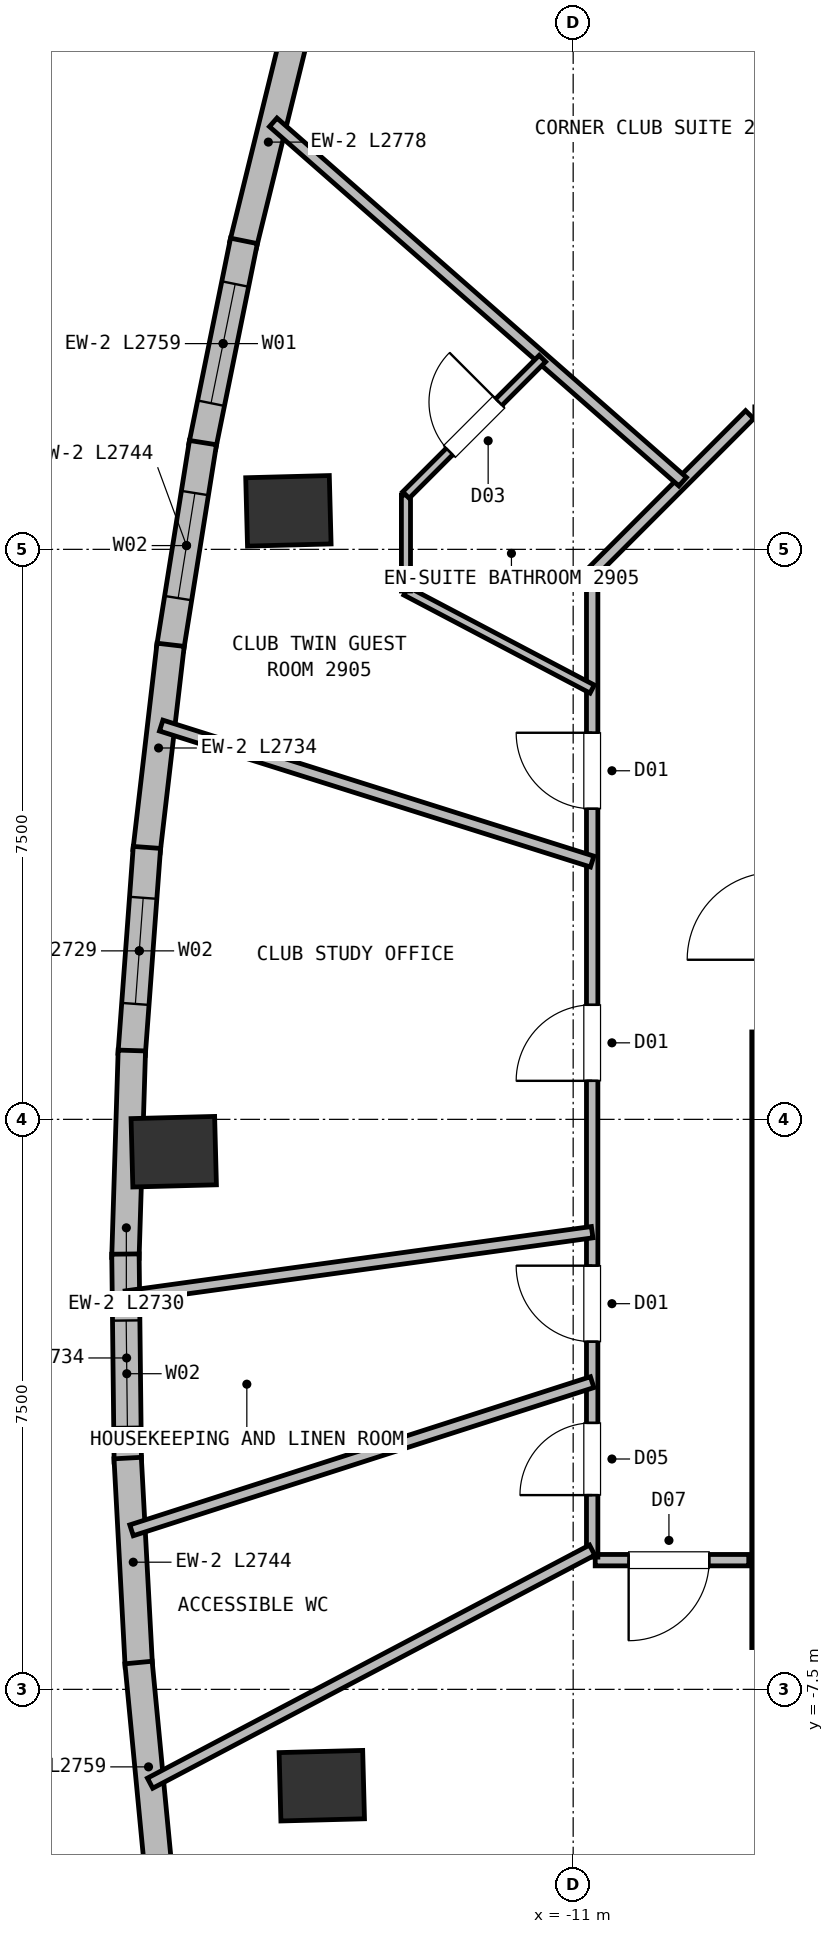
"""IFC4 building model, lengths in metres.
Left out: names, types, materials, properties, quantities, classifications, styles, units other than length and angle.
Written with IfcOpenShell. Run it as: python <this file> out.ifc"""

import sys

from ifc_helpers import new_model, si_unit, direction, frame, frame_2d, origin, origin_2d, place, context, subcontext, project, spatial, rectangle, extrude, element, fill, save


model = new_model("IFC4")
c1 = context("Model", 3, precision=1e-05, world=origin(), true_north=direction((0.0, 1.0)))
c2 = subcontext(c1, "Body", "Model", "MODEL_VIEW")
j1 = project(units=[si_unit("LENGTHUNIT", "METRE"), si_unit("PLANEANGLEUNIT", "RADIAN")], contexts=[c1])
p1 = place(None, origin())
s1 = spatial("IfcSite", under=j1, at=p1, CompositionType="ELEMENT")
p2 = place(p1, origin())
s2 = spatial("IfcBuilding", under=s1, at=p2, CompositionType="ELEMENT")
p3 = place(p2, frame((0.0, 0.0, 108.5)))
s3 = spatial("IfcBuildingStorey", under=s2, at=p3, CompositionType="ELEMENT", Elevation=108.5)
p4 = place(p3, frame((-8.35, -6.95, 0.0), z_axis=(0.0, 0.0, 1.0), x_axis=(0.0, 1.0, 0.0)))
e1 = element("IfcWall", 1, at=p4, inside=s3, PredefinedType="SHEAR", context=c2, shape_type="SweptSolid", body=[
    extrude(rectangle(XDim=8.1, YDim=0.6, at=frame_2d((4.05, 0.0))), origin(), (0.0, 0.0, 1.0), 3.5),
])
for number, where, z_axis, x_axis in (
    (2, (-14.747, 8.007, 0.0), (0.0, 0.0, 1.0), (-0.026, 1.0, 0.0)),
    (3, (-16.255, -0.426, 0.0), (0.0, 0.0, 1.0), (-0.026, 1.0, 0.0)),
    (4, (-14.307, -8.768, 0.0), (0.0, 0.0, 1.0), (-0.026, 1.0, 0.0)),
):
    element("IfcColumn", number, at=place(p3, frame(where, z_axis=z_axis, x_axis=x_axis)), inside=s3, PredefinedType="COLUMN", context=c2, shape_type="SweptSolid", body=[
        extrude(rectangle(XDim=0.9, YDim=1.1, at=origin_2d()), origin(), (0.0, 0.0, 1.0), 3.75),
    ])
p5 = place(p3, frame((-15.342, 11.51, 0.0), z_axis=(0.0, 0.0, 1.0), x_axis=(0.238997371457, 0.971020214227, 0.0)))
e5 = element("IfcWall", 5, at=p5, inside=s3, PredefinedType="SOLIDWALL", context=c2, shape_type="SweptSolid", body=[
    extrude(rectangle(XDim=2.778, YDim=0.36, at=frame_2d((1.389, 0.0))), origin(), (0.0, 0.0, 1.0), 3.5),
])
p6 = place(p3, frame((-15.88, 8.855, 0.0), z_axis=(0.0, 0.0, 1.0), x_axis=(0.198770408376, 0.980046082975, 0.0)))
e6 = element("IfcWall", 6, at=p6, inside=s3, PredefinedType="SOLIDWALL", context=c2, shape_type="SweptSolid", body=[
    extrude(rectangle(XDim=2.759, YDim=0.36, at=frame_2d((1.379, 0.0))), origin(), (0.0, 0.0, 1.0), 3.5),
])
p7 = place(p6, frame((0.579, 0.0, 0.72)))
e7 = element("IfcOpeningElement", 7, at=p7, cuts=e6, PredefinedType="OPENING", context=c2, shape_type="SweptSolid", body=[
    extrude(rectangle(XDim=1.6, YDim=1.88, at=frame_2d((0.8, 0.94))), frame((0.0, 0.19, 0.0), z_axis=(0.0, -1.0, 0.0), x_axis=(1.0, 0.0, 0.0)), (0.0, 0.0, 1.0), 0.38),
])
p8 = place(p3, frame((-16.303, 6.195, 0.0), z_axis=(0.0, 0.0, 1.0), x_axis=(0.157483842532, 0.987521563988, 0.0)))
e8 = element("IfcWall", 8, at=p8, inside=s3, PredefinedType="SOLIDWALL", context=c2, shape_type="SweptSolid", body=[
    extrude(rectangle(XDim=2.744, YDim=0.36, at=frame_2d((1.372, 0.0))), origin(), (0.0, 0.0, 1.0), 3.5),
])
p9 = place(p8, frame((0.672, 0.0, 0.72)))
e9 = element("IfcOpeningElement", 9, at=p9, cuts=e8, PredefinedType="OPENING", context=c2, shape_type="SweptSolid", body=[
    extrude(rectangle(XDim=1.4, YDim=1.84, at=frame_2d((0.7, 0.92))), frame((0.0, 0.19, 0.0), z_axis=(0.0, -1.0, 0.0), x_axis=(1.0, 0.0, 0.0)), (0.0, 0.0, 1.0), 0.38),
])
p10 = place(p3, frame((-16.613, 3.528, 0.0), z_axis=(0.0, 0.0, 1.0), x_axis=(0.115711868465, 0.993282821505, 0.0)))
e10 = element("IfcWall", 10, at=p10, inside=s3, PredefinedType="SOLIDWALL", context=c2, shape_type="SweptSolid", body=[
    extrude(rectangle(XDim=2.734, YDim=0.36, at=frame_2d((1.367, 0.0))), origin(), (0.0, 0.0, 1.0), 3.5),
])
p11 = place(p3, frame((-16.809, 0.856, 0.0), z_axis=(0.0, 0.0, 1.0), x_axis=(0.07352900805, 0.997293078776, 0.0)))
e11 = element("IfcWall", 11, at=p11, inside=s3, PredefinedType="SOLIDWALL", context=c2, shape_type="SweptSolid", body=[
    extrude(rectangle(XDim=2.729, YDim=0.36, at=frame_2d((1.365, 0.0))), origin(), (0.0, 0.0, 1.0), 3.5),
])
p12 = place(p11, frame((0.665, 0.0, 0.72)))
e12 = element("IfcOpeningElement", 12, at=p12, cuts=e11, PredefinedType="OPENING", context=c2, shape_type="SweptSolid", body=[
    extrude(rectangle(XDim=1.4, YDim=1.84, at=frame_2d((0.7, 0.92))), frame((0.0, 0.19, 0.0), z_axis=(0.0, -1.0, 0.0), x_axis=(1.0, 0.0, 0.0)), (0.0, 0.0, 1.0), 0.38),
])
p13 = place(p3, frame((-16.891, -1.823, 0.0), z_axis=(0.0, 0.0, 1.0), x_axis=(0.031036495161, 0.999518251943, 0.0)))
e13 = element("IfcWall", 13, at=p13, inside=s3, PredefinedType="SOLIDWALL", context=c2, shape_type="SweptSolid", body=[
    extrude(rectangle(XDim=2.729, YDim=0.36, at=frame_2d((1.365, 0.0))), origin(), (0.0, 0.0, 1.0), 3.5),
])
p14 = place(p3, frame((-16.86, -4.507, 0.0), z_axis=(0.0, 0.0, 1.0), x_axis=(-0.011339569117, 0.999935705019, 0.0)))
e14 = element("IfcWall", 14, at=p14, inside=s3, PredefinedType="SOLIDWALL", context=c2, shape_type="SweptSolid", body=[
    extrude(rectangle(XDim=2.734, YDim=0.36, at=frame_2d((1.367, 0.0))), origin(), (0.0, 0.0, 1.0), 3.5),
])
p15 = place(p14, frame((0.46, 0.0, 0.72)))
e15 = element("IfcOpeningElement", 15, at=p15, cuts=e14, PredefinedType="OPENING", context=c2, shape_type="SweptSolid", body=[
    extrude(rectangle(XDim=1.4, YDim=1.84, at=frame_2d((0.7, 0.92))), frame((0.0, 0.19, 0.0), z_axis=(0.0, -1.0, 0.0), x_axis=(1.0, 0.0, 0.0)), (0.0, 0.0, 1.0), 0.38),
])
p16 = place(p3, frame((-16.715, -7.197, 0.0), z_axis=(0.0, 0.0, 1.0), x_axis=(-0.053474125499, 0.998569235407, 0.0)))
e16 = element("IfcWall", 16, at=p16, inside=s3, PredefinedType="SOLIDWALL", context=c2, shape_type="SweptSolid", body=[
    extrude(rectangle(XDim=2.744, YDim=0.36, at=frame_2d((1.372, 0.0))), origin(), (0.0, 0.0, 1.0), 3.5),
])
p17 = place(p3, frame((-16.456, -9.893, 0.0), z_axis=(0.0, 0.0, 1.0), x_axis=(-0.095147411159, 0.99546319377, 0.0)))
e17 = element("IfcWall", 17, at=p17, inside=s3, PredefinedType="SOLIDWALL", context=c2, shape_type="SweptSolid", body=[
    extrude(rectangle(XDim=2.758, YDim=0.36, at=frame_2d((1.379, 0.0))), origin(), (0.0, 0.0, 1.0), 3.5),
])
p18 = place(p3, frame((-8.69, -5.8, 0.0), z_axis=(0.0, 0.0, 1.0), x_axis=(-1.0, 0.0, 0.0)))
e18 = element("IfcWall", 18, at=p18, inside=s3, PredefinedType="PARTITIONING", context=c2, shape_type="SweptSolid", body=[
    extrude(rectangle(XDim=2.02, YDim=0.15, at=frame_2d((1.01, 0.0))), origin(), (0.0, 0.0, 1.0), 3.5),
])
p19 = place(p18, frame((0.52, 0.0, 0.0)))
e19 = element("IfcOpeningElement", 19, at=p19, cuts=e18, PredefinedType="OPENING", context=c2, shape_type="SweptSolid", body=[
    extrude(rectangle(XDim=1.06, YDim=2.15, at=frame_2d((0.53, 1.075))), frame((0.0, 0.085, 0.0), z_axis=(0.0, -1.0, 0.0), x_axis=(1.0, 0.0, 0.0)), (0.0, 0.0, 1.0), 0.17),
])
p20 = place(p3, frame((-10.722, 7.228, 0.0), z_axis=(0.0, 0.0, 1.0), x_axis=(0.707106781187, 0.707106781187, 0.0)))
e20 = element("IfcWall", 20, at=p20, inside=s3, PredefinedType="PARTITIONING", context=c2, shape_type="SweptSolid", body=[
    extrude(rectangle(XDim=2.89, YDim=0.15, at=frame_2d((1.445, 0.0))), origin(), (0.0, 0.0, 1.0), 3.5),
])
p21 = place(p3, frame((-10.75, -5.76, 0.0), z_axis=(0.0, 0.0, 1.0), x_axis=(0.0, 1.0, 0.0)))
e21 = element("IfcWall", 21, at=p21, inside=s3, PredefinedType="PARTITIONING", context=c2, shape_type="SweptSolid", body=[
    extrude(rectangle(XDim=12.92, YDim=0.15, at=frame_2d((6.46, 0.0))), origin(), (0.0, 0.0, 1.0), 3.5),
])
p22 = place(p21, frame((2.835, 0.0, 0.0)))
e22 = element("IfcOpeningElement", 22, at=p22, cuts=e21, PredefinedType="OPENING", context=c2, shape_type="SweptSolid", body=[
    extrude(rectangle(XDim=1.0, YDim=2.15, at=frame_2d((0.5, 1.075))), frame((0.0, 0.085, 0.0), z_axis=(0.0, -1.0, 0.0), x_axis=(1.0, 0.0, 0.0)), (0.0, 0.0, 1.0), 0.17),
])
p23 = place(p21, frame((0.816, 0.0, 0.0)))
e23 = element("IfcOpeningElement", 23, at=p23, cuts=e21, PredefinedType="OPENING", context=c2, shape_type="SweptSolid", body=[
    extrude(rectangle(XDim=0.95, YDim=2.1, at=frame_2d((0.475, 1.05))), frame((0.0, 0.085, 0.0), z_axis=(0.0, -1.0, 0.0), x_axis=(1.0, 0.0, 0.0)), (0.0, 0.0, 1.0), 0.17),
])
p24 = place(p21, frame((9.847, 0.0, 0.0)))
e24 = element("IfcOpeningElement", 24, at=p24, cuts=e21, PredefinedType="OPENING", context=c2, shape_type="SweptSolid", body=[
    extrude(rectangle(XDim=1.0, YDim=2.15, at=frame_2d((0.5, 1.075))), frame((0.0, 0.085, 0.0), z_axis=(0.0, -1.0, 0.0), x_axis=(1.0, 0.0, 0.0)), (0.0, 0.0, 1.0), 0.17),
])
p25 = place(p21, frame((6.267, 0.0, 0.0)))
e25 = element("IfcOpeningElement", 25, at=p25, cuts=e21, PredefinedType="OPENING", context=c2, shape_type="SweptSolid", body=[
    extrude(rectangle(XDim=1.0, YDim=2.15, at=frame_2d((0.5, 1.075))), frame((0.0, 0.085, 0.0), z_axis=(0.0, -1.0, 0.0), x_axis=(1.0, 0.0, 0.0)), (0.0, 0.0, 1.0), 0.17),
])
p26 = place(p3, frame((-10.75, -5.668, 0.0), z_axis=(0.0, 0.0, 1.0), x_axis=(-0.88456520122, -0.466416557158, 0.0)))
e26 = element("IfcWall", 26, at=p26, inside=s3, PredefinedType="PARTITIONING", context=c2, shape_type="SweptSolid", body=[
    extrude(rectangle(XDim=6.575, YDim=0.15, at=frame_2d((3.288, 0.0))), origin(), (0.0, 0.0, 1.0), 3.5),
])
p27 = place(p3, frame((-9.56, 8.39, 0.0), z_axis=(0.0, 0.0, 1.0), x_axis=(-0.751546074468, 0.659680602983, 0.0)))
e27 = element("IfcWall", 27, at=p27, inside=s3, PredefinedType="PARTITIONING", context=c2, shape_type="SweptSolid", body=[
    extrude(rectangle(XDim=7.167, YDim=0.15, at=frame_2d((3.584, 0.0))), origin(), (0.0, 0.0, 1.0), 3.5),
])
p28 = place(p3, frame((-13.2, 6.952, 0.0), z_axis=(0.0, 0.0, 1.0), x_axis=(0.884793871957, -0.465982622152, 0.0)))
e28 = element("IfcWall", 28, at=p28, inside=s3, PredefinedType="PARTITIONING", context=c2, shape_type="SweptSolid", body=[
    extrude(rectangle(XDim=2.769, YDim=0.12, at=frame_2d((1.385, 0.0))), origin(), (0.0, 0.0, 1.0), 3.5),
])
p29 = place(p3, frame((-13.2, 6.952, 0.0), z_axis=(0.0, 0.0, 1.0), x_axis=(0.0, 1.0, 0.0)))
e29 = element("IfcWall", 29, at=p29, inside=s3, PredefinedType="PARTITIONING", context=c2, shape_type="SweptSolid", body=[
    extrude(rectangle(XDim=1.263, YDim=0.12, at=frame_2d((0.631, 0.0))), origin(), (0.0, 0.0, 1.0), 3.5),
])
p30 = place(p3, frame((-13.2, 8.215, 0.0), z_axis=(0.0, 0.0, 1.0), x_axis=(0.707106781187, 0.707106781187, 0.0)))
e30 = element("IfcWall", 30, at=p30, inside=s3, PredefinedType="PARTITIONING", context=c2, shape_type="SweptSolid", body=[
    extrude(rectangle(XDim=2.539, YDim=0.12, at=frame_2d((1.27, 0.0))), origin(), (0.0, 0.0, 1.0), 3.5),
])
p31 = place(p30, frame((0.81, 0.0, 0.0)))
e31 = element("IfcOpeningElement", 31, at=p31, cuts=e30, PredefinedType="OPENING", context=c2, shape_type="SweptSolid", body=[
    extrude(rectangle(XDim=0.92, YDim=2.1, at=frame_2d((0.46, 1.05))), frame((0.0, 0.07, 0.0), z_axis=(0.0, -1.0, 0.0), x_axis=(1.0, 0.0, 0.0)), (0.0, 0.0, 1.0), 0.14),
])
p32 = place(p3, frame((-10.75, 3.392, 0.0), z_axis=(0.0, 0.0, 1.0), x_axis=(-0.953655865199, 0.300899469545, 0.0)))
e32 = element("IfcWall", 32, at=p32, inside=s3, PredefinedType="PARTITIONING", context=c2, shape_type="SweptSolid", body=[
    extrude(rectangle(XDim=5.946, YDim=0.15, at=frame_2d((2.973, 0.0))), origin(), (0.0, 0.0, 1.0), 3.5),
])
p33 = place(p3, frame((-10.75, -1.485, 0.0), z_axis=(0.0, 0.0, 1.0), x_axis=(-0.990603271239, -0.136766805219, 0.0)))
e33 = element("IfcWall", 33, at=p33, inside=s3, PredefinedType="PARTITIONING", context=c2, shape_type="SweptSolid", body=[
    extrude(rectangle(XDim=6.192, YDim=0.15, at=frame_2d((3.096, 0.0))), origin(), (0.0, 0.0, 1.0), 3.5),
])
p34 = place(p3, frame((-10.75, -3.458, 0.0), z_axis=(0.0, 0.0, 1.0), x_axis=(-0.951970686229, -0.306189177732, 0.0)))
e34 = element("IfcWall", 34, at=p34, inside=s3, PredefinedType="PARTITIONING", context=c2, shape_type="SweptSolid", body=[
    extrude(rectangle(XDim=6.366, YDim=0.15, at=frame_2d((3.183, 0.0))), origin(), (0.0, 0.0, 1.0), 3.5),
])
p35 = place(p7, origin())
e35 = element("IfcWindow", 35, at=p35, inside=s3, PartitioningType="SINGLE_PANEL", PredefinedType="WINDOW", context=c2, shape_type="SweptSolid", body=[
    extrude(rectangle(XDim=1.6, YDim=1.88, at=frame_2d((0.8, 0.94))), frame((0.0, 0.03, 0.0), z_axis=(0.0, -1.0, 0.0), x_axis=(1.0, 0.0, 0.0)), (0.0, 0.0, 1.0), 0.06),
])
fill(e7, e35)
p36 = place(p9, origin())
e36 = element("IfcWindow", 36, at=p36, inside=s3, PartitioningType="SINGLE_PANEL", PredefinedType="WINDOW", context=c2, shape_type="SweptSolid", body=[
    extrude(rectangle(XDim=1.4, YDim=1.84, at=frame_2d((0.7, 0.92))), frame((0.0, 0.03, 0.0), z_axis=(0.0, -1.0, 0.0), x_axis=(1.0, 0.0, 0.0)), (0.0, 0.0, 1.0), 0.06),
])
fill(e9, e36)
p37 = place(p12, origin())
e37 = element("IfcWindow", 37, at=p37, inside=s3, PartitioningType="SINGLE_PANEL", PredefinedType="WINDOW", context=c2, shape_type="SweptSolid", body=[
    extrude(rectangle(XDim=1.4, YDim=1.84, at=frame_2d((0.7, 0.92))), frame((0.0, 0.03, 0.0), z_axis=(0.0, -1.0, 0.0), x_axis=(1.0, 0.0, 0.0)), (0.0, 0.0, 1.0), 0.06),
])
fill(e12, e37)
p38 = place(p15, origin())
e38 = element("IfcWindow", 38, at=p38, inside=s3, PartitioningType="SINGLE_PANEL", PredefinedType="WINDOW", context=c2, shape_type="SweptSolid", body=[
    extrude(rectangle(XDim=1.4, YDim=1.84, at=frame_2d((0.7, 0.92))), frame((0.0, 0.03, 0.0), z_axis=(0.0, -1.0, 0.0), x_axis=(1.0, 0.0, 0.0)), (0.0, 0.0, 1.0), 0.06),
])
fill(e15, e38)
p39 = place(p31, origin())
e39 = element("IfcDoor", 39, at=p39, inside=s3, OperationType="SINGLE_SWING_RIGHT", PredefinedType="DOOR", context=c2, shape_type="SweptSolid", body=[
    extrude(rectangle(XDim=0.92, YDim=2.1, at=frame_2d((0.46, 1.05))), frame((0.0, 0.025, 0.0), z_axis=(0.0, -1.0, 0.0), x_axis=(1.0, 0.0, 0.0)), (0.0, 0.0, 1.0), 0.05),
])
fill(e31, e39)
p40 = place(p22, origin())
e40 = element("IfcDoor", 40, at=p40, inside=s3, OperationType="SINGLE_SWING_RIGHT", PredefinedType="DOOR", context=c2, shape_type="SweptSolid", body=[
    extrude(rectangle(XDim=1.0, YDim=2.15, at=frame_2d((0.5, 1.075))), frame((0.0, 0.025, 0.0), z_axis=(0.0, -1.0, 0.0), x_axis=(1.0, 0.0, 0.0)), (0.0, 0.0, 1.0), 0.05),
])
fill(e22, e40)
p41 = place(p23, origin())
e41 = element("IfcDoor", 41, at=p41, inside=s3, OperationType="SINGLE_SWING_LEFT", PredefinedType="DOOR", context=c2, shape_type="SweptSolid", body=[
    extrude(rectangle(XDim=0.95, YDim=2.1, at=frame_2d((0.475, 1.05))), frame((0.0, 0.025, 0.0), z_axis=(0.0, -1.0, 0.0), x_axis=(1.0, 0.0, 0.0)), (0.0, 0.0, 1.0), 0.05),
])
fill(e23, e41)
p42 = place(p24, origin())
e42 = element("IfcDoor", 42, at=p42, inside=s3, OperationType="SINGLE_SWING_RIGHT", PredefinedType="DOOR", context=c2, shape_type="SweptSolid", body=[
    extrude(rectangle(XDim=1.0, YDim=2.15, at=frame_2d((0.5, 1.075))), frame((0.0, 0.025, 0.0), z_axis=(0.0, -1.0, 0.0), x_axis=(1.0, 0.0, 0.0)), (0.0, 0.0, 1.0), 0.05),
])
fill(e24, e42)
p43 = place(p25, origin())
e43 = element("IfcDoor", 43, at=p43, inside=s3, OperationType="SINGLE_SWING_LEFT", PredefinedType="DOOR", context=c2, shape_type="SweptSolid", body=[
    extrude(rectangle(XDim=1.0, YDim=2.15, at=frame_2d((0.5, 1.075))), frame((0.0, 0.025, 0.0), z_axis=(0.0, -1.0, 0.0), x_axis=(1.0, 0.0, 0.0)), (0.0, 0.0, 1.0), 0.05),
])
fill(e25, e43)
p44 = place(p19, origin())
e44 = element("IfcDoor", 44, at=p44, inside=s3, OperationType="SINGLE_SWING_RIGHT", PredefinedType="DOOR", context=c2, shape_type="SweptSolid", body=[
    extrude(rectangle(XDim=1.06, YDim=2.15, at=frame_2d((0.53, 1.075))), frame((0.0, 0.025, 0.0), z_axis=(0.0, -1.0, 0.0), x_axis=(1.0, 0.0, 0.0)), (0.0, 0.0, 1.0), 0.05),
])
fill(e19, e44)
save(model, sys.argv[1])
